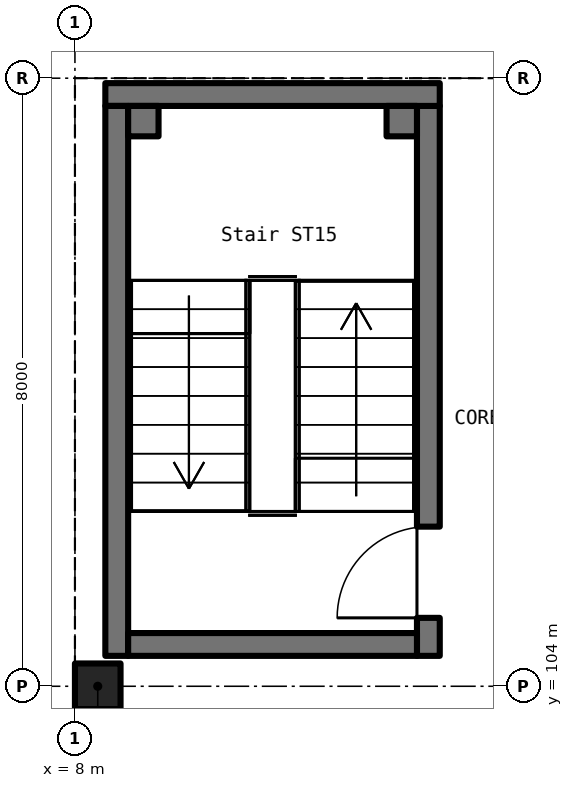
"""IFC4 building model, lengths in metres.
Left out: names, types, materials, properties, quantities, classifications, styles, units other than length and angle.
Written with IfcOpenShell. Run it as: python <this file> out.ifc"""

import sys

from ifc_helpers import new_model, si_unit, direction, frame, frame_2d, origin, origin_2d, place, context, subcontext, project, spatial, rectangle, extrude, element, fill, save


model = new_model("IFC4")
c1 = context("Model", 3, precision=1e-05, world=origin(), true_north=direction((0.0, 1.0)))
c2 = subcontext(c1, "Body", "Model", "MODEL_VIEW")
j1 = project(units=[si_unit("LENGTHUNIT", "METRE"), si_unit("PLANEANGLEUNIT", "RADIAN")], contexts=[c1])
p1 = place(None, origin())
s1 = spatial("IfcSite", under=j1, at=p1, CompositionType="ELEMENT")
p2 = place(p1, origin())
s2 = spatial("IfcBuilding", under=s1, at=p2, CompositionType="ELEMENT")
p3 = place(p2, frame((0.0, 0.0, -6.0)))
s3 = spatial("IfcBuildingStorey", under=s2, at=p3, CompositionType="ELEMENT", Elevation=-6.0)
p4 = place(p3, frame((8.3, 104.0, 0.0), z_axis=(0.0, 0.0, 1.0), x_axis=(1.0, 0.0, 0.0)))
e1 = element("IfcColumn", 1, at=p4, inside=s3, PredefinedType="COLUMN", context=c2, shape_type="SweptSolid", body=[
    extrude(rectangle(XDim=0.6, YDim=0.6, at=origin_2d()), origin(), (0.0, 0.0, 1.0), 6.0),
])
p5 = place(p3, frame((12.65, 104.4, 0.0), z_axis=(0.0, 0.0, 1.0), x_axis=(0.0, 1.0, 0.0)))
e2 = element("IfcWall", 2, at=p5, inside=s3, PredefinedType="SOLIDWALL", context=c2, shape_type="SweptSolid", body=[
    extrude(rectangle(XDim=7.235, YDim=0.3, at=frame_2d((3.618, 0.0))), origin(), (0.0, 0.0, 1.0), 6.0),
])
p6 = place(p5, frame((0.5, 0.0, 0.0)))
e3 = element("IfcOpeningElement", 3, at=p6, cuts=e2, PredefinedType="OPENING", context=c2, shape_type="SweptSolid", body=[
    extrude(rectangle(XDim=1.2, YDim=2.1, at=frame_2d((0.6, 1.05))), frame((0.0, 0.162, 0.0), z_axis=(0.0, -1.0, 0.0), x_axis=(1.0, 0.0, 0.0)), (0.0, 0.0, 1.0), 0.324),
])
p7 = place(p3, frame((12.8, 111.785, 0.0), z_axis=(0.0, 0.0, 1.0), x_axis=(-1.0, 0.0, 0.0)))
e4 = element("IfcWall", 4, at=p7, inside=s3, PredefinedType="SOLIDWALL", context=c2, shape_type="SweptSolid", body=[
    extrude(rectangle(XDim=4.4, YDim=0.3, at=frame_2d((2.2, 0.0))), origin(), (0.0, 0.0, 1.0), 6.0),
])
p8 = place(p3, frame((8.55, 111.635, 0.0), z_axis=(0.0, 0.0, 1.0), x_axis=(0.0, -1.0, 0.0)))
e5 = element("IfcWall", 5, at=p8, inside=s3, PredefinedType="SOLIDWALL", context=c2, shape_type="SweptSolid", body=[
    extrude(rectangle(XDim=7.235, YDim=0.3, at=frame_2d((3.618, 0.0))), origin(), (0.0, 0.0, 1.0), 6.0),
])
p9 = place(p3, frame((8.7, 104.55, 0.0), z_axis=(0.0, 0.0, 1.0), x_axis=(1.0, 0.0, 0.0)))
e6 = element("IfcWall", 6, at=p9, inside=s3, PredefinedType="SOLIDWALL", context=c2, shape_type="SweptSolid", body=[
    extrude(rectangle(XDim=3.8, YDim=0.3, at=frame_2d((1.9, 0.0))), origin(), (0.0, 0.0, 1.0), 6.0),
])
p10 = place(p3, frame((12.5, 111.435, 0.0), z_axis=(0.0, 0.0, 1.0), x_axis=(-1.0, 0.0, 0.0)))
e7 = element("IfcWall", 7, at=p10, inside=s3, PredefinedType="SOLIDWALL", context=c2, shape_type="SweptSolid", body=[
    extrude(rectangle(XDim=0.4, YDim=0.4, at=frame_2d((0.2, 0.0))), origin(), (0.0, 0.0, 1.0), 6.0),
])
p11 = place(p3, frame((9.1, 111.435, 0.0), z_axis=(0.0, 0.0, 1.0), x_axis=(-1.0, 0.0, 0.0)))
e8 = element("IfcWall", 8, at=p11, inside=s3, PredefinedType="SOLIDWALL", context=c2, shape_type="SweptSolid", body=[
    extrude(rectangle(XDim=0.4, YDim=0.4, at=frame_2d((0.2, 0.0))), origin(), (0.0, 0.0, 1.0), 6.0),
])
p12 = place(p6, origin())
e9 = element("IfcDoor", 9, at=p12, inside=s3, OperationType="SINGLE_SWING_LEFT", PredefinedType="DOOR", context=c2, shape_type="SweptSolid", body=[
    extrude(rectangle(XDim=1.2, YDim=2.1, at=frame_2d((0.6, 1.05))), frame((0.0, 0.025, 0.0), z_axis=(0.0, -1.0, 0.0), x_axis=(1.0, 0.0, 0.0)), (0.0, 0.0, 1.0), 0.05),
])
fill(e3, e9)
save(model, sys.argv[1])
